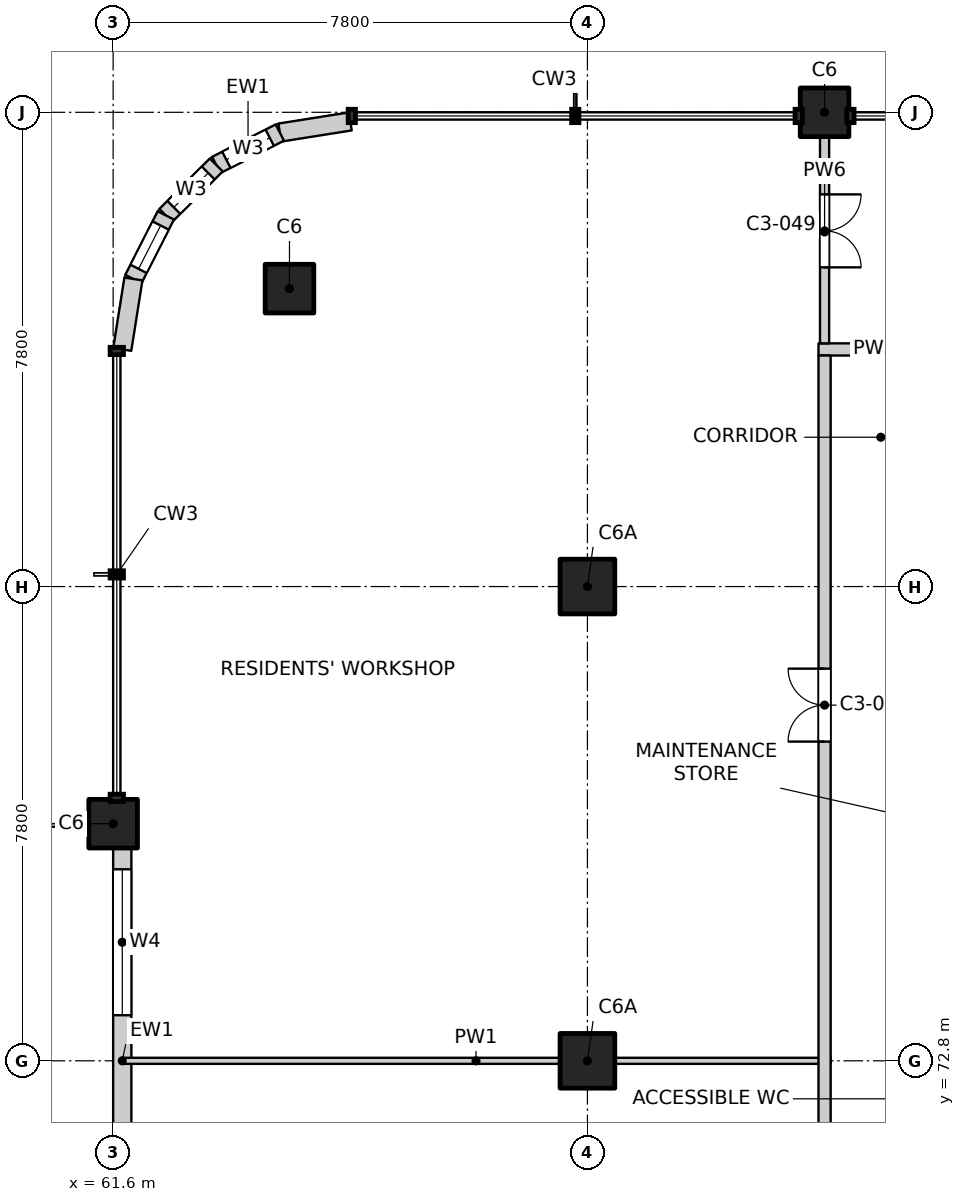
"""IFC4 building model, lengths in metres.
Left out: names, types, materials, properties, quantities, classifications, styles, units other than length and angle.
Written with IfcOpenShell. Run it as: python <this file> out.ifc"""

import sys

from ifc_helpers import new_model, si_unit, direction, frame, frame_2d, origin, origin_2d, place, context, subcontext, project, spatial, rectangle, extrude, element, fill, save


model = new_model("IFC4")
c1 = context("Model", 3, precision=1e-05, world=origin(), true_north=direction((0.0, 1.0)))
c2 = subcontext(c1, "Body", "Model", "MODEL_VIEW")
j1 = project(units=[si_unit("LENGTHUNIT", "METRE"), si_unit("PLANEANGLEUNIT", "RADIAN")], contexts=[c1])
p1 = place(None, origin())
s1 = spatial("IfcSite", under=j1, at=p1, CompositionType="ELEMENT")
p2 = place(p1, origin())
s2 = spatial("IfcBuilding", under=s1, at=p2, CompositionType="ELEMENT")
p3 = place(p2, frame((0.0, 0.0, 200.7)))
s3 = spatial("IfcBuildingStorey", under=s2, at=p3, CompositionType="ELEMENT", Elevation=200.7)
for number, where, z_axis, x_axis in (
    (1, (64.5, 85.5, -0.25), (0.0, 0.0, 1.0), (1.0, 0.0, 0.0)),
    (2, (73.3, 88.4, -0.25), (0.0, 0.0, 1.0), (1.0, 0.0, 0.0)),
    (3, (61.6, 76.7, -0.25), (0.0, 0.0, 1.0), (1.0, 0.0, 0.0)),
):
    element("IfcColumn", number, at=place(p3, frame(where, z_axis=z_axis, x_axis=x_axis)), inside=s3, PredefinedType="COLUMN", context=c2, shape_type="SweptSolid", body=[
        extrude(rectangle(XDim=0.8, YDim=0.8, at=origin_2d()), origin(), (0.0, 0.0, 1.0), 3.4),
    ])
for number, where, z_axis, x_axis in (
    (4, (69.4, 72.8, -0.25), (0.0, 0.0, 1.0), (1.0, 0.0, 0.0)),
    (5, (69.4, 80.6, -0.25), (0.0, 0.0, 1.0), (1.0, 0.0, 0.0)),
):
    element("IfcColumn", number, at=place(p3, frame(where, z_axis=z_axis, x_axis=x_axis)), inside=s3, PredefinedType="COLUMN", context=c2, shape_type="SweptSolid", body=[
        extrude(rectangle(XDim=0.9, YDim=0.9, at=origin_2d()), origin(), (0.0, 0.0, 1.0), 3.4),
    ])
p4 = place(p3, frame((61.75, 69.3, 0.0), z_axis=(0.0, 0.0, 1.0), x_axis=(0.0, 1.0, 0.0)))
e6 = element("IfcWall", 6, at=p4, inside=s3, PredefinedType="SOLIDWALL", context=c2, shape_type="SweptSolid", body=[
    extrude(rectangle(XDim=7.0, YDim=0.3, at=frame_2d((3.5, 0.0))), origin(), (0.0, 0.0, 1.0), 2.7),
])
p5 = place(p4, frame((0.65, 0.0, 0.0)))
e7 = element("IfcOpeningElement", 7, at=p5, cuts=e6, PredefinedType="OPENING", context=c2, shape_type="SweptSolid", body=[
    extrude(rectangle(XDim=1.8, YDim=2.4, at=frame_2d((0.9, 1.2))), frame((0.0, 0.16, 0.0), z_axis=(0.0, -1.0, 0.0), x_axis=(1.0, 0.0, 0.0)), (0.0, 0.0, 1.0), 0.32),
])
p6 = place(p4, frame((4.25, 0.0, 0.6)))
e8 = element("IfcOpeningElement", 8, at=p6, cuts=e6, PredefinedType="OPENING", context=c2, shape_type="SweptSolid", body=[
    extrude(rectangle(XDim=2.4, YDim=2.1, at=frame_2d((1.2, 1.05))), frame((0.0, 0.16, 0.0), z_axis=(0.0, -1.0, 0.0), x_axis=(1.0, 0.0, 0.0)), (0.0, 0.0, 1.0), 0.32),
])
p7 = place(p3, frame((65.5, 88.25, 0.0), z_axis=(0.0, 0.0, 1.0), x_axis=(-0.987678452879, -0.156496880861, 0.0)))
e9 = element("IfcWall", 9, at=p7, inside=s3, PredefinedType="SOLIDWALL", context=c2, shape_type="SweptSolid", body=[
    extrude(rectangle(XDim=1.173, YDim=0.3, at=frame_2d((0.586, 0.0))), origin(), (0.0, 0.0, 1.0), 2.7),
])
p8 = place(p3, frame((64.341, 88.066, 0.0), z_axis=(0.0, 0.0, 1.0), x_axis=(-0.890988677504, -0.454025524128, 0.0)))
e10 = element("IfcWall", 10, at=p8, inside=s3, PredefinedType="SOLIDWALL", context=c2, shape_type="SweptSolid", body=[
    extrude(rectangle(XDim=1.173, YDim=0.3, at=frame_2d((0.587, 0.0))), origin(), (0.0, 0.0, 1.0), 2.7),
])
p9 = place(p8, frame((0.187, 0.0, 0.9)))
e11 = element("IfcOpeningElement", 11, at=p9, cuts=e10, PredefinedType="OPENING", context=c2, shape_type="SweptSolid", body=[
    extrude(rectangle(XDim=0.8, YDim=1.2, at=frame_2d((0.4, 0.6))), frame((0.0, 0.16, 0.0), z_axis=(0.0, -1.0, 0.0), x_axis=(1.0, 0.0, 0.0)), (0.0, 0.0, 1.0), 0.32),
])
p10 = place(p3, frame((63.296, 87.534, 0.0), z_axis=(0.0, 0.0, 1.0), x_axis=(-0.707106781187, -0.707106781187, 0.0)))
e12 = element("IfcWall", 12, at=p10, inside=s3, PredefinedType="SOLIDWALL", context=c2, shape_type="SweptSolid", body=[
    extrude(rectangle(XDim=1.173, YDim=0.3, at=frame_2d((0.586, 0.0))), origin(), (0.0, 0.0, 1.0), 2.7),
])
p11 = place(p10, frame((0.187, 0.0, 0.9)))
e13 = element("IfcOpeningElement", 13, at=p11, cuts=e12, PredefinedType="OPENING", context=c2, shape_type="SweptSolid", body=[
    extrude(rectangle(XDim=0.8, YDim=1.2, at=frame_2d((0.4, 0.6))), frame((0.0, 0.16, 0.0), z_axis=(0.0, -1.0, 0.0), x_axis=(1.0, 0.0, 0.0)), (0.0, 0.0, 1.0), 0.32),
])
p12 = place(p3, frame((62.466, 86.704, 0.0), z_axis=(0.0, 0.0, 1.0), x_axis=(-0.454025524128, -0.890988677504, 0.0)))
e14 = element("IfcWall", 14, at=p12, inside=s3, PredefinedType="SOLIDWALL", context=c2, shape_type="SweptSolid", body=[
    extrude(rectangle(XDim=1.173, YDim=0.3, at=frame_2d((0.587, 0.0))), origin(), (0.0, 0.0, 1.0), 2.7),
])
p13 = place(p12, frame((0.187, 0.0, 0.9)))
e15 = element("IfcOpeningElement", 15, at=p13, cuts=e14, PredefinedType="OPENING", context=c2, shape_type="SweptSolid", body=[
    extrude(rectangle(XDim=0.8, YDim=1.2, at=frame_2d((0.4, 0.6))), frame((0.0, 0.16, 0.0), z_axis=(0.0, -1.0, 0.0), x_axis=(1.0, 0.0, 0.0)), (0.0, 0.0, 1.0), 0.32),
])
p14 = place(p3, frame((61.934, 85.659, 0.0), z_axis=(0.0, 0.0, 1.0), x_axis=(-0.156496880861, -0.987678452879, 0.0)))
e16 = element("IfcWall", 16, at=p14, inside=s3, PredefinedType="SOLIDWALL", context=c2, shape_type="SweptSolid", body=[
    extrude(rectangle(XDim=1.173, YDim=0.3, at=frame_2d((0.586, 0.0))), origin(), (0.0, 0.0, 1.0), 2.7),
])
p15 = place(p3, frame((61.735, 72.8, 0.0), z_axis=(0.0, 0.0, 1.0), x_axis=(1.0, 0.0, 0.0)))
e17 = element("IfcWall", 17, at=p15, inside=s3, PredefinedType="PARTITIONING", context=c2, shape_type="SweptSolid", body=[
    extrude(rectangle(XDim=11.665, YDim=0.1, at=frame_2d((5.833, 0.0))), origin(), (0.0, 0.0, 1.0), 3.15),
])
p16 = place(p3, frame((73.2, 84.5, 0.0), z_axis=(0.0, 0.0, 1.0), x_axis=(1.0, 0.0, 0.0)))
e18 = element("IfcWall", 18, at=p16, inside=s3, PredefinedType="PARTITIONING", context=c2, shape_type="SweptSolid", body=[
    extrude(rectangle(XDim=1.85, YDim=0.2, at=frame_2d((0.925, 0.0))), origin(), (0.0, 0.0, 1.0), 3.15),
])
p17 = place(p3, frame((73.3, 49.5, 0.0), z_axis=(0.0, 0.0, 1.0), x_axis=(0.0, 1.0, 0.0)))
e19 = element("IfcWall", 19, at=p17, inside=s3, PredefinedType="PARTITIONING", context=c2, shape_type="SweptSolid", body=[
    extrude(rectangle(XDim=34.9, YDim=0.2, at=frame_2d((17.45, 0.0))), origin(), (0.0, 0.0, 1.0), 3.15),
])
p18 = place(p17, frame((6.2, 0.0, 0.0)))
e20 = element("IfcOpeningElement", 20, at=p18, cuts=e19, PredefinedType="OPENING", context=c2, shape_type="SweptSolid", body=[
    extrude(rectangle(XDim=1.2, YDim=2.1, at=frame_2d((0.6, 1.05))), frame((0.0, 0.11, 0.0), z_axis=(0.0, -1.0, 0.0), x_axis=(1.0, 0.0, 0.0)), (0.0, 0.0, 1.0), 0.22),
])
p19 = place(p17, frame((12.95, 0.0, 0.0)))
e21 = element("IfcOpeningElement", 21, at=p19, cuts=e19, PredefinedType="OPENING", context=c2, shape_type="SweptSolid", body=[
    extrude(rectangle(XDim=1.2, YDim=2.1, at=frame_2d((0.6, 1.05))), frame((0.0, 0.11, 0.0), z_axis=(0.0, -1.0, 0.0), x_axis=(1.0, 0.0, 0.0)), (0.0, 0.0, 1.0), 0.22),
])
p20 = place(p17, frame((16.85, 0.0, 0.0)))
e22 = element("IfcOpeningElement", 22, at=p20, cuts=e19, PredefinedType="OPENING", context=c2, shape_type="SweptSolid", body=[
    extrude(rectangle(XDim=1.2, YDim=2.1, at=frame_2d((0.6, 1.05))), frame((0.0, 0.11, 0.0), z_axis=(0.0, -1.0, 0.0), x_axis=(1.0, 0.0, 0.0)), (0.0, 0.0, 1.0), 0.22),
])
p21 = place(p17, frame((28.55, 0.0, 0.0)))
e23 = element("IfcOpeningElement", 23, at=p21, cuts=e19, PredefinedType="OPENING", context=c2, shape_type="SweptSolid", body=[
    extrude(rectangle(XDim=1.2, YDim=2.1, at=frame_2d((0.6, 1.05))), frame((0.0, 0.11, 0.0), z_axis=(0.0, -1.0, 0.0), x_axis=(1.0, 0.0, 0.0)), (0.0, 0.0, 1.0), 0.22),
])
p22 = place(p3, frame((73.3, 84.6, 0.0), z_axis=(0.0, 0.0, 1.0), x_axis=(0.0, 1.0, 0.0)))
e24 = element("IfcWall", 24, at=p22, inside=s3, PredefinedType="PARTITIONING", context=c2, shape_type="SweptSolid", body=[
    extrude(rectangle(XDim=3.665, YDim=0.15, at=frame_2d((1.833, 0.0))), origin(), (0.0, 0.0, 1.0), 3.15),
])
p23 = place(p22, frame((1.25, 0.0, 0.0)))
e25 = element("IfcOpeningElement", 25, at=p23, cuts=e24, PredefinedType="OPENING", context=c2, shape_type="SweptSolid", body=[
    extrude(rectangle(XDim=1.2, YDim=2.1, at=frame_2d((0.6, 1.05))), frame((0.0, 0.085, 0.0), z_axis=(0.0, -1.0, 0.0), x_axis=(1.0, 0.0, 0.0)), (0.0, 0.0, 1.0), 0.17),
])
p24 = place(p6, origin())
e26 = element("IfcWindow", 26, at=p24, inside=s3, PartitioningType="SINGLE_PANEL", PredefinedType="WINDOW", context=c2, shape_type="SweptSolid", body=[
    extrude(rectangle(XDim=2.4, YDim=2.1, at=frame_2d((1.2, 1.05))), frame((0.0, 0.03, 0.0), z_axis=(0.0, -1.0, 0.0), x_axis=(1.0, 0.0, 0.0)), (0.0, 0.0, 1.0), 0.06),
])
fill(e8, e26)
p25 = place(p9, origin())
e27 = element("IfcWindow", 27, at=p25, inside=s3, PartitioningType="SINGLE_PANEL", PredefinedType="WINDOW", context=c2, shape_type="SweptSolid", body=[
    extrude(rectangle(XDim=0.8, YDim=1.2, at=frame_2d((0.4, 0.6))), frame((0.0, 0.03, 0.0), z_axis=(0.0, -1.0, 0.0), x_axis=(1.0, 0.0, 0.0)), (0.0, 0.0, 1.0), 0.06),
])
fill(e11, e27)
p26 = place(p11, origin())
e28 = element("IfcWindow", 28, at=p26, inside=s3, PartitioningType="SINGLE_PANEL", PredefinedType="WINDOW", context=c2, shape_type="SweptSolid", body=[
    extrude(rectangle(XDim=0.8, YDim=1.2, at=frame_2d((0.4, 0.6))), frame((0.0, 0.03, 0.0), z_axis=(0.0, -1.0, 0.0), x_axis=(1.0, 0.0, 0.0)), (0.0, 0.0, 1.0), 0.06),
])
fill(e13, e28)
p27 = place(p13, origin())
e29 = element("IfcWindow", 29, at=p27, inside=s3, PartitioningType="SINGLE_PANEL", PredefinedType="WINDOW", context=c2, shape_type="SweptSolid", body=[
    extrude(rectangle(XDim=0.8, YDim=1.2, at=frame_2d((0.4, 0.6))), frame((0.0, 0.03, 0.0), z_axis=(0.0, -1.0, 0.0), x_axis=(1.0, 0.0, 0.0)), (0.0, 0.0, 1.0), 0.06),
])
fill(e15, e29)
p28 = place(p21, origin())
e30 = element("IfcDoor", 30, at=p28, inside=s3, OperationType="DOUBLE_DOOR_SINGLE_SWING", PredefinedType="DOOR", context=c2, shape_type="SweptSolid", body=[
    extrude(rectangle(XDim=1.2, YDim=2.1, at=frame_2d((0.6, 1.05))), frame((0.0, 0.025, 0.0), z_axis=(0.0, -1.0, 0.0), x_axis=(1.0, 0.0, 0.0)), (0.0, 0.0, 1.0), 0.05),
])
fill(e23, e30)
p29 = place(p23, origin())
e31 = element("IfcDoor", 31, at=p29, inside=s3, OperationType="DOUBLE_DOOR_SINGLE_SWING", PredefinedType="DOOR", context=c2, shape_type="SweptSolid", body=[
    extrude(rectangle(XDim=1.2, YDim=2.1, at=frame_2d((0.6, 1.05))), frame((0.0, 0.025, 0.0), z_axis=(0.0, -1.0, 0.0), x_axis=(1.0, 0.0, 0.0)), (0.0, 0.0, 1.0), 0.05),
])
fill(e25, e31)
save(model, sys.argv[1])
